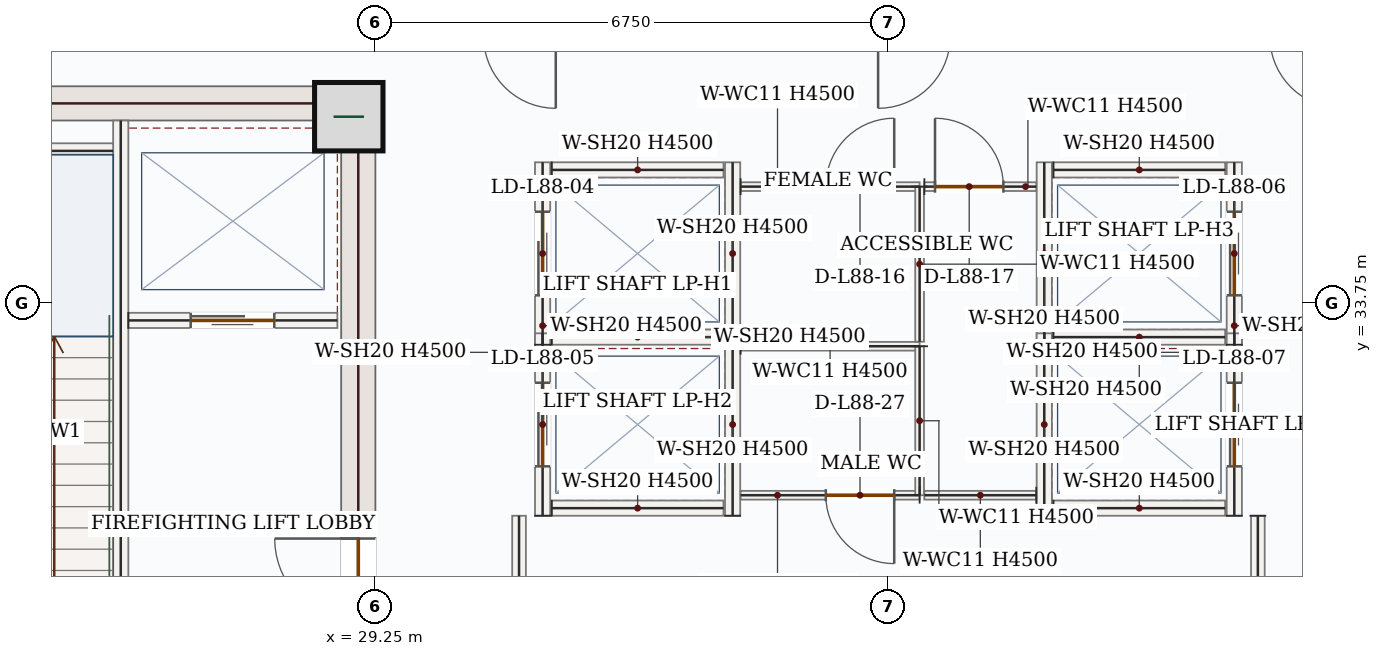
"""IFC4 building model, lengths in metres.
Left out: names, types, materials, properties, quantities, classifications, styles, units other than length and angle.
Written with IfcOpenShell. Run it as: python <this file> out.ifc"""

import sys

from ifc_helpers import new_model, si_unit, direction, frame, frame_2d, origin, origin_2d, place, context, subcontext, project, spatial, rectangle, extrude, source, transform, mapped, element, fill, save


model = new_model("IFC4")
c1 = context("Model", 3, precision=1e-05, world=origin(), true_north=direction((0.0, 1.0)))
c2 = subcontext(c1, "Body", "Model", "MODEL_VIEW")
j1 = project(units=[si_unit("LENGTHUNIT", "METRE"), si_unit("PLANEANGLEUNIT", "RADIAN")], contexts=[c1])
p1 = place(None, origin())
s1 = spatial("IfcSite", under=j1, at=p1, CompositionType="ELEMENT")
p2 = place(p1, origin())
s2 = spatial("IfcBuilding", under=s1, at=p2, CompositionType="ELEMENT")
p3 = place(p2, frame((0.0, 0.0, 361.05)))
s3 = spatial("IfcBuildingStorey", under=s2, at=p3, CompositionType="ELEMENT", Elevation=361.05)
p4 = place(p3, frame((29.025, 28.05, 0.0), z_axis=(0.0, 0.0, 1.0), x_axis=(0.0, 1.0, 0.0)))
e1 = element("IfcWall", 1, at=p4, inside=s3, PredefinedType="SHEAR", context=c2, shape_type="SweptSolid", body=[
    extrude(rectangle(XDim=8.55, YDim=0.45, at=frame_2d((4.275, 0.0))), origin(), (0.0, 0.0, 1.0), 4.5),
])
p5 = place(p4, frame((1.5, 0.0, 0.0)))
e2 = element("IfcOpeningElement", 2, at=p5, cuts=e1, PredefinedType="OPENING", context=c2, shape_type="SweptSolid", body=[
    extrude(rectangle(XDim=1.1, YDim=2.2, at=frame_2d((0.55, 1.1))), frame((0.0, 0.235, 0.0), z_axis=(0.0, -1.0, 0.0), x_axis=(1.0, 0.0, 0.0)), (0.0, 0.0, 1.0), 0.47),
])
m1 = source(origin(), c2, "Body", "SweptSolid", [
    extrude(rectangle(XDim=7.1, YDim=0.45, at=frame_2d((3.55, 0.0))), origin(), (0.0, 0.0, 1.0), 4.5),
])
p6 = place(p3, frame((21.7, 36.375, 0.0), z_axis=(0.0, 0.0, 1.0), x_axis=(1.0, 0.0, 0.0)))
e3 = element("IfcWall", 3, at=p6, inside=s3, PredefinedType="SHEAR", context=c2, shape_type="MappedRepresentation", body=[
    mapped(m1, transform((0.0, 0.0, 0.0), x_axis=(1.0, 0.0, 0.0), y_axis=(0.0, 1.0, 0.0), z_axis=(0.0, 0.0, 1.0), scale=1.0)),
])
m2 = source(origin(), c2, "Body", "SweptSolid", [
    extrude(rectangle(XDim=0.9, YDim=0.9, at=origin_2d()), origin(), (0.0, 0.0, 1.0), 4.8),
])
p7 = place(p3, frame((28.9, 36.2, 0.0), z_axis=(0.0, 0.0, 1.0), x_axis=(1.0, 0.0, 0.0)))
e4 = element("IfcColumn", 4, at=p7, inside=s3, PredefinedType="COLUMN", context=c2, shape_type="MappedRepresentation", body=[
    mapped(m2, transform((0.0, 0.0, 0.0), x_axis=(1.0, 0.0, 0.0), y_axis=(0.0, 1.0, 0.0), z_axis=(0.0, 0.0, 1.0), scale=1.0)),
])
p8 = place(p3, frame((25.9, 28.15, 0.0), z_axis=(0.0, 0.0, 1.0), x_axis=(0.0, 1.0, 0.0)))
e5 = element("IfcWall", 5, at=p8, inside=s3, PredefinedType="SOLIDWALL", context=c2, shape_type="SweptSolid", body=[
    extrude(rectangle(XDim=8.0, YDim=0.2, at=frame_2d((4.0, 0.0))), origin(), (0.0, 0.0, 1.0), 4.5),
])
p9 = place(p8, frame((0.4, 0.0, 0.0)))
e6 = element("IfcOpeningElement", 6, at=p9, cuts=e5, PredefinedType="OPENING", context=c2, shape_type="SweptSolid", body=[
    extrude(rectangle(XDim=1.05, YDim=2.15, at=frame_2d((0.525, 1.075))), frame((0.0, 0.11, 0.0), z_axis=(0.0, -1.0, 0.0), x_axis=(1.0, 0.0, 0.0)), (0.0, 0.0, 1.0), 0.22),
])
m3 = source(origin(), c2, "Body", "SweptSolid", [
    extrude(rectangle(XDim=3.25, YDim=0.2, at=frame_2d((1.625, 0.0))), origin(), (0.0, 0.0, 1.0), 4.5),
])
p10 = place(p3, frame((22.55, 35.75, 0.0), z_axis=(0.0, 0.0, 1.0), x_axis=(1.0, 0.0, 0.0)))
e7 = element("IfcWall", 7, at=p10, inside=s3, PredefinedType="SOLIDWALL", context=c2, shape_type="MappedRepresentation", body=[
    mapped(m3, transform((0.0, 0.0, 0.0), x_axis=(1.0, 0.0, 0.0), y_axis=(0.0, 1.0, 0.0), z_axis=(0.0, 0.0, 1.0), scale=1.0)),
])
p11 = place(p3, frame((26.0, 33.52, 0.0), z_axis=(0.0, 0.0, 1.0), x_axis=(1.0, 0.0, 0.0)))
e8 = element("IfcWall", 8, at=p11, inside=s3, PredefinedType="SOLIDWALL", context=c2, shape_type="SweptSolid", body=[
    extrude(rectangle(XDim=2.75, YDim=0.2, at=frame_2d((1.375, 0.0))), origin(), (0.0, 0.0, 1.0), 4.5),
])
p12 = place(p11, frame((0.82, 0.0, 0.0)))
e9 = element("IfcOpeningElement", 9, at=p12, cuts=e8, PredefinedType="OPENING", context=c2, shape_type="SweptSolid", body=[
    extrude(rectangle(XDim=1.1, YDim=2.15, at=frame_2d((0.55, 1.075))), frame((0.0, 0.11, 0.0), z_axis=(0.0, -1.0, 0.0), x_axis=(1.0, 0.0, 0.0)), (0.0, 0.0, 1.0), 0.22),
])
p13 = place(p3, frame((31.45, 33.2, 0.0), z_axis=(0.0, 0.0, 1.0), x_axis=(0.0, 1.0, 0.0)))
e10 = element("IfcWall", 10, at=p13, inside=s3, PredefinedType="SOLIDWALL", context=c2, shape_type="SweptSolid", body=[
    extrude(rectangle(XDim=2.4, YDim=0.2, at=frame_2d((1.2, 0.0))), origin(), (0.0, 0.0, 1.0), 4.5),
])
p14 = place(p13, frame((0.65, 0.0, 0.0)))
e11 = element("IfcOpeningElement", 11, at=p14, cuts=e10, PredefinedType="OPENING", context=c2, shape_type="SweptSolid", body=[
    extrude(rectangle(XDim=1.1, YDim=2.15, at=frame_2d((0.55, 1.075))), frame((0.0, 0.11, 0.0), z_axis=(0.0, -1.0, 0.0), x_axis=(1.0, 0.0, 0.0)), (0.0, 0.0, 1.0), 0.22),
])
m4 = source(origin(), c2, "Body", "SweptSolid", [
    extrude(rectangle(XDim=2.4, YDim=0.2, at=frame_2d((1.2, 0.0))), origin(), (0.0, 0.0, 1.0), 4.5),
])
p15 = place(p3, frame((33.95, 33.2, 0.0), z_axis=(0.0, 0.0, 1.0), x_axis=(0.0, 1.0, 0.0)))
e12 = element("IfcWall", 12, at=p15, inside=s3, PredefinedType="SOLIDWALL", context=c2, shape_type="MappedRepresentation", body=[
    mapped(m4, transform((0.0, 0.0, 0.0), x_axis=(1.0, 0.0, 0.0), y_axis=(0.0, 1.0, 0.0), z_axis=(0.0, 0.0, 1.0), scale=1.0)),
])
m5 = source(origin(), c2, "Body", "SweptSolid", [
    extrude(rectangle(XDim=2.26, YDim=0.2, at=frame_2d((1.13, 0.0))), origin(), (0.0, 0.0, 1.0), 4.5),
])
for number, where, z_axis, x_axis in (
    (13, (31.57, 33.3, 0.0), (0.0, 0.0, 1.0), (1.0, 0.0, 0.0)),
    (14, (31.57, 35.5, 0.0), (0.0, 0.0, 1.0), (1.0, 0.0, 0.0)),
):
    element("IfcWall", number, at=place(p3, frame(where, z_axis=z_axis, x_axis=x_axis)), inside=s3, PredefinedType="SOLIDWALL", context=c2, shape_type="MappedRepresentation", body=[
        mapped(m5, transform((0.0, 0.0, 0.0), x_axis=(1.0, 0.0, 0.0), y_axis=(0.0, 1.0, 0.0), z_axis=(0.0, 0.0, 1.0), scale=1.0)),
    ])
p16 = place(p3, frame((31.45, 30.95, 0.0), z_axis=(0.0, 0.0, 1.0), x_axis=(0.0, 1.0, 0.0)))
e15 = element("IfcWall", 15, at=p16, inside=s3, PredefinedType="SOLIDWALL", context=c2, shape_type="SweptSolid", body=[
    extrude(rectangle(XDim=2.4, YDim=0.2, at=frame_2d((1.2, 0.0))), origin(), (0.0, 0.0, 1.0), 4.5),
])
p17 = place(p16, frame((0.65, 0.0, 0.0)))
e16 = element("IfcOpeningElement", 16, at=p17, cuts=e15, PredefinedType="OPENING", context=c2, shape_type="SweptSolid", body=[
    extrude(rectangle(XDim=1.1, YDim=2.15, at=frame_2d((0.55, 1.075))), frame((0.0, 0.11, 0.0), z_axis=(0.0, -1.0, 0.0), x_axis=(1.0, 0.0, 0.0)), (0.0, 0.0, 1.0), 0.22),
])
p18 = place(p3, frame((33.95, 30.95, 0.0), z_axis=(0.0, 0.0, 1.0), x_axis=(0.0, 1.0, 0.0)))
e17 = element("IfcWall", 17, at=p18, inside=s3, PredefinedType="SOLIDWALL", context=c2, shape_type="MappedRepresentation", body=[
    mapped(m4, transform((0.0, 0.0, 0.0), x_axis=(1.0, 0.0, 0.0), y_axis=(0.0, 1.0, 0.0), z_axis=(0.0, 0.0, 1.0), scale=1.0)),
])
p19 = place(p3, frame((31.57, 31.05, 0.0), z_axis=(0.0, 0.0, 1.0), x_axis=(1.0, 0.0, 0.0)))
e18 = element("IfcWall", 18, at=p19, inside=s3, PredefinedType="SOLIDWALL", context=c2, shape_type="MappedRepresentation", body=[
    mapped(m5, transform((0.0, 0.0, 0.0), x_axis=(1.0, 0.0, 0.0), y_axis=(0.0, 1.0, 0.0), z_axis=(0.0, 0.0, 1.0), scale=1.0)),
])
p20 = place(p3, frame((38.05, 33.2, 0.0), z_axis=(0.0, 0.0, 1.0), x_axis=(0.0, 1.0, 0.0)))
e19 = element("IfcWall", 19, at=p20, inside=s3, PredefinedType="SOLIDWALL", context=c2, shape_type="MappedRepresentation", body=[
    mapped(m4, transform((0.0, 0.0, 0.0), x_axis=(1.0, 0.0, 0.0), y_axis=(0.0, 1.0, 0.0), z_axis=(0.0, 0.0, 1.0), scale=1.0)),
])
p21 = place(p3, frame((40.55, 33.2, 0.0), z_axis=(0.0, 0.0, 1.0), x_axis=(0.0, 1.0, 0.0)))
e20 = element("IfcWall", 20, at=p21, inside=s3, PredefinedType="SOLIDWALL", context=c2, shape_type="SweptSolid", body=[
    extrude(rectangle(XDim=2.4, YDim=0.2, at=frame_2d((1.2, 0.0))), origin(), (0.0, 0.0, 1.0), 4.5),
])
p22 = place(p21, frame((0.65, 0.0, 0.0)))
e21 = element("IfcOpeningElement", 21, at=p22, cuts=e20, PredefinedType="OPENING", context=c2, shape_type="SweptSolid", body=[
    extrude(rectangle(XDim=1.1, YDim=2.15, at=frame_2d((0.55, 1.075))), frame((0.0, 0.11, 0.0), z_axis=(0.0, -1.0, 0.0), x_axis=(1.0, 0.0, 0.0)), (0.0, 0.0, 1.0), 0.22),
])
for number, where, z_axis, x_axis in (
    (22, (38.17, 33.3, 0.0), (0.0, 0.0, 1.0), (1.0, 0.0, 0.0)),
    (23, (38.17, 35.5, 0.0), (0.0, 0.0, 1.0), (1.0, 0.0, 0.0)),
):
    element("IfcWall", number, at=place(p3, frame(where, z_axis=z_axis, x_axis=x_axis)), inside=s3, PredefinedType="SOLIDWALL", context=c2, shape_type="MappedRepresentation", body=[
        mapped(m5, transform((0.0, 0.0, 0.0), x_axis=(1.0, 0.0, 0.0), y_axis=(0.0, 1.0, 0.0), z_axis=(0.0, 0.0, 1.0), scale=1.0)),
    ])
p23 = place(p3, frame((38.05, 30.95, 0.0), z_axis=(0.0, 0.0, 1.0), x_axis=(0.0, 1.0, 0.0)))
e24 = element("IfcWall", 24, at=p23, inside=s3, PredefinedType="SOLIDWALL", context=c2, shape_type="MappedRepresentation", body=[
    mapped(m4, transform((0.0, 0.0, 0.0), x_axis=(1.0, 0.0, 0.0), y_axis=(0.0, 1.0, 0.0), z_axis=(0.0, 0.0, 1.0), scale=1.0)),
])
p24 = place(p3, frame((40.55, 30.95, 0.0), z_axis=(0.0, 0.0, 1.0), x_axis=(0.0, 1.0, 0.0)))
e25 = element("IfcWall", 25, at=p24, inside=s3, PredefinedType="SOLIDWALL", context=c2, shape_type="SweptSolid", body=[
    extrude(rectangle(XDim=2.4, YDim=0.2, at=frame_2d((1.2, 0.0))), origin(), (0.0, 0.0, 1.0), 4.5),
])
p25 = place(p24, frame((0.65, 0.0, 0.0)))
e26 = element("IfcOpeningElement", 26, at=p25, cuts=e25, PredefinedType="OPENING", context=c2, shape_type="SweptSolid", body=[
    extrude(rectangle(XDim=1.1, YDim=2.15, at=frame_2d((0.55, 1.075))), frame((0.0, 0.11, 0.0), z_axis=(0.0, -1.0, 0.0), x_axis=(1.0, 0.0, 0.0)), (0.0, 0.0, 1.0), 0.22),
])
p26 = place(p3, frame((38.17, 31.05, 0.0), z_axis=(0.0, 0.0, 1.0), x_axis=(1.0, 0.0, 0.0)))
e27 = element("IfcWall", 27, at=p26, inside=s3, PredefinedType="SOLIDWALL", context=c2, shape_type="MappedRepresentation", body=[
    mapped(m5, transform((0.0, 0.0, 0.0), x_axis=(1.0, 0.0, 0.0), y_axis=(0.0, 1.0, 0.0), z_axis=(0.0, 0.0, 1.0), scale=1.0)),
])
p27 = place(p3, frame((36.41, 31.22, 0.0), z_axis=(0.0, 0.0, 1.0), x_axis=(-1.0, 0.0, 0.0)))
e28 = element("IfcWall", 28, at=p27, inside=s3, PredefinedType="PARTITIONING", context=c2, shape_type="SweptSolid", body=[
    extrude(rectangle(XDim=2.355, YDim=0.115, at=frame_2d((1.177, 0.0))), origin(), (0.0, 0.0, 1.0), 4.5),
])
p28 = place(p27, frame((0.334, 0.0, 0.0)))
e29 = element("IfcOpeningElement", 29, at=p28, cuts=e28, PredefinedType="OPENING", context=c2, shape_type="SweptSolid", body=[
    extrude(rectangle(XDim=0.9, YDim=2.1, at=frame_2d((0.45, 1.05))), frame((0.0, 0.067, 0.0), z_axis=(0.0, -1.0, 0.0), x_axis=(1.0, 0.0, 0.0)), (0.0, 0.0, 1.0), 0.135),
])
m6 = source(origin(), c2, "Body", "SweptSolid", [
    extrude(rectangle(XDim=2.355, YDim=0.115, at=frame_2d((1.177, 0.0))), origin(), (0.0, 0.0, 1.0), 4.5),
])
p29 = place(p3, frame((34.055, 33.18, 0.0), z_axis=(0.0, 0.0, 1.0), x_axis=(1.0, 0.0, 0.0)))
e30 = element("IfcWall", 30, at=p29, inside=s3, PredefinedType="PARTITIONING", context=c2, shape_type="MappedRepresentation", body=[
    mapped(m6, transform((0.0, 0.0, 0.0), x_axis=(1.0, 0.0, 0.0), y_axis=(0.0, 1.0, 0.0), z_axis=(0.0, 0.0, 1.0), scale=1.0)),
])
m7 = source(origin(), c2, "Body", "SweptSolid", [
    extrude(rectangle(XDim=1.96, YDim=0.115, at=frame_2d((0.98, 0.0))), origin(), (0.0, 0.0, 1.0), 4.5),
])
p30 = place(p3, frame((36.41, 33.18, 0.0), z_axis=(0.0, 0.0, 1.0), x_axis=(0.0, -1.0, 0.0)))
e31 = element("IfcWall", 31, at=p30, inside=s3, PredefinedType="PARTITIONING", context=c2, shape_type="MappedRepresentation", body=[
    mapped(m7, transform((0.0, 0.0, 0.0), x_axis=(1.0, 0.0, 0.0), y_axis=(0.0, 1.0, 0.0), z_axis=(0.0, 0.0, 1.0), scale=1.0)),
])
p31 = place(p3, frame((34.055, 35.28, 0.0), z_axis=(0.0, 0.0, 1.0), x_axis=(1.0, 0.0, 0.0)))
e32 = element("IfcWall", 32, at=p31, inside=s3, PredefinedType="PARTITIONING", context=c2, shape_type="SweptSolid", body=[
    extrude(rectangle(XDim=2.355, YDim=0.115, at=frame_2d((1.177, 0.0))), origin(), (0.0, 0.0, 1.0), 4.5),
])
p32 = place(p31, frame((1.121, 0.0, 0.0)))
e33 = element("IfcOpeningElement", 33, at=p32, cuts=e32, PredefinedType="OPENING", context=c2, shape_type="SweptSolid", body=[
    extrude(rectangle(XDim=0.9, YDim=2.1, at=frame_2d((0.45, 1.05))), frame((0.0, 0.067, 0.0), z_axis=(0.0, -1.0, 0.0), x_axis=(1.0, 0.0, 0.0)), (0.0, 0.0, 1.0), 0.135),
])
m8 = source(origin(), c2, "Body", "SweptSolid", [
    extrude(rectangle(XDim=2.04, YDim=0.115, at=frame_2d((1.02, 0.0))), origin(), (0.0, 0.0, 1.0), 4.5),
])
p33 = place(p3, frame((36.41, 35.28, 0.0), z_axis=(0.0, 0.0, 1.0), x_axis=(0.0, -1.0, 0.0)))
e34 = element("IfcWall", 34, at=p33, inside=s3, PredefinedType="PARTITIONING", context=c2, shape_type="MappedRepresentation", body=[
    mapped(m8, transform((0.0, 0.0, 0.0), x_axis=(1.0, 0.0, 0.0), y_axis=(0.0, 1.0, 0.0), z_axis=(0.0, 0.0, 1.0), scale=1.0)),
])
m9 = source(origin(), c2, "Body", "SweptSolid", [
    extrude(rectangle(XDim=1.473, YDim=0.115, at=frame_2d((0.736, 0.0))), origin(), (0.0, 0.0, 1.0), 4.5),
])
p34 = place(p3, frame((37.945, 31.22, 0.0), z_axis=(0.0, 0.0, 1.0), x_axis=(-1.0, 0.0, 0.0)))
e35 = element("IfcWall", 35, at=p34, inside=s3, PredefinedType="PARTITIONING", context=c2, shape_type="MappedRepresentation", body=[
    mapped(m9, transform((0.0, 0.0, 0.0), x_axis=(1.0, 0.0, 0.0), y_axis=(0.0, 1.0, 0.0), z_axis=(0.0, 0.0, 1.0), scale=1.0)),
])
p35 = place(p3, frame((36.472, 35.28, 0.0), z_axis=(0.0, 0.0, 1.0), x_axis=(1.0, 0.0, 0.0)))
e36 = element("IfcWall", 36, at=p35, inside=s3, PredefinedType="PARTITIONING", context=c2, shape_type="SweptSolid", body=[
    extrude(rectangle(XDim=1.473, YDim=0.115, at=frame_2d((0.736, 0.0))), origin(), (0.0, 0.0, 1.0), 4.5),
])
p36 = place(p35, frame((0.14, 0.0, 0.0)))
e37 = element("IfcOpeningElement", 37, at=p36, cuts=e36, PredefinedType="OPENING", context=c2, shape_type="SweptSolid", body=[
    extrude(rectangle(XDim=0.9, YDim=2.1, at=frame_2d((0.45, 1.05))), frame((0.0, 0.067, 0.0), z_axis=(0.0, -1.0, 0.0), x_axis=(1.0, 0.0, 0.0)), (0.0, 0.0, 1.0), 0.135),
])
m10 = source(origin(), c2, "Body", "SweptSolid", [
    extrude(rectangle(XDim=5.14, YDim=0.18, at=frame_2d((2.57, 0.0))), origin(), (0.0, 0.0, 1.0), 4.5),
])
p37 = place(p3, frame((31.14, 25.81, 0.0), z_axis=(0.0, 0.0, 1.0), x_axis=(0.0, 1.0, 0.0)))
e38 = element("IfcWall", 38, at=p37, inside=s3, PredefinedType="PARTITIONING", context=c2, shape_type="MappedRepresentation", body=[
    mapped(m10, transform((0.0, 0.0, 0.0), x_axis=(1.0, 0.0, 0.0), y_axis=(0.0, 1.0, 0.0), z_axis=(0.0, 0.0, 1.0), scale=1.0)),
])
p38 = place(p3, frame((40.86, 30.95, 0.0), z_axis=(0.0, 0.0, 1.0), x_axis=(0.0, -1.0, 0.0)))
e39 = element("IfcWall", 39, at=p38, inside=s3, PredefinedType="PARTITIONING", context=c2, shape_type="SweptSolid", body=[
    extrude(rectangle(XDim=5.215, YDim=0.18, at=frame_2d((2.607, 0.0))), origin(), (0.0, 0.0, 1.0), 4.5),
])
p39 = place(p38, frame((3.302, 0.0, 0.0)))
e40 = element("IfcOpeningElement", 40, at=p39, cuts=e39, PredefinedType="OPENING", context=c2, shape_type="SweptSolid", body=[
    extrude(rectangle(XDim=1.0, YDim=2.15, at=frame_2d((0.5, 1.075))), frame((0.0, 0.1, 0.0), z_axis=(0.0, -1.0, 0.0), x_axis=(1.0, 0.0, 0.0)), (0.0, 0.0, 1.0), 0.2),
])
m11 = source(origin(), c2, "Body", "SweptSolid", [
    extrude(rectangle(XDim=1.1, YDim=2.15, at=frame_2d((0.55, 1.075))), frame((0.0, 0.025, 0.0), z_axis=(0.0, -1.0, 0.0), x_axis=(1.0, 0.0, 0.0)), (0.0, 0.0, 1.0), 0.05),
])
p40 = place(p12, origin())
e41 = element("IfcDoor", 41, at=p40, inside=s3, OperationType="DOUBLE_DOOR_SLIDING", PredefinedType="DOOR", context=c2, shape_type="MappedRepresentation", body=[
    mapped(m11, transform((0.0, 0.0, 0.0), x_axis=(1.0, 0.0, 0.0), y_axis=(0.0, 1.0, 0.0), z_axis=(0.0, 0.0, 1.0), scale=1.0)),
])
fill(e9, e41)
m12 = source(origin(), c2, "Body", "SweptSolid", [
    extrude(rectangle(XDim=1.1, YDim=2.2, at=frame_2d((0.55, 1.1))), frame((0.0, 0.025, 0.0), z_axis=(0.0, -1.0, 0.0), x_axis=(1.0, 0.0, 0.0)), (0.0, 0.0, 1.0), 0.05),
])
p41 = place(p5, origin())
e42 = element("IfcDoor", 42, at=p41, inside=s3, OperationType="SINGLE_SWING_RIGHT", PredefinedType="DOOR", context=c2, shape_type="MappedRepresentation", body=[
    mapped(m12, transform((0.0, 0.0, 0.0), x_axis=(1.0, 0.0, 0.0), y_axis=(0.0, 1.0, 0.0), z_axis=(0.0, 0.0, 1.0), scale=1.0)),
])
fill(e2, e42)
p42 = place(p14, origin())
e43 = element("IfcDoor", 43, at=p42, inside=s3, OperationType="DOUBLE_DOOR_SLIDING", PredefinedType="DOOR", context=c2, shape_type="MappedRepresentation", body=[
    mapped(m11, transform((0.0, 0.0, 0.0), x_axis=(1.0, 0.0, 0.0), y_axis=(0.0, 1.0, 0.0), z_axis=(0.0, 0.0, 1.0), scale=1.0)),
])
fill(e11, e43)
p43 = place(p17, origin())
e44 = element("IfcDoor", 44, at=p43, inside=s3, OperationType="DOUBLE_DOOR_SLIDING", PredefinedType="DOOR", context=c2, shape_type="MappedRepresentation", body=[
    mapped(m11, transform((0.0, 0.0, 0.0), x_axis=(1.0, 0.0, 0.0), y_axis=(0.0, 1.0, 0.0), z_axis=(0.0, 0.0, 1.0), scale=1.0)),
])
fill(e16, e44)
p44 = place(p22, origin())
e45 = element("IfcDoor", 45, at=p44, inside=s3, OperationType="DOUBLE_DOOR_SLIDING", PredefinedType="DOOR", context=c2, shape_type="MappedRepresentation", body=[
    mapped(m11, transform((0.0, 0.0, 0.0), x_axis=(1.0, 0.0, 0.0), y_axis=(0.0, 1.0, 0.0), z_axis=(0.0, 0.0, 1.0), scale=1.0)),
])
fill(e21, e45)
p45 = place(p25, origin())
e46 = element("IfcDoor", 46, at=p45, inside=s3, OperationType="DOUBLE_DOOR_SLIDING", PredefinedType="DOOR", context=c2, shape_type="MappedRepresentation", body=[
    mapped(m11, transform((0.0, 0.0, 0.0), x_axis=(1.0, 0.0, 0.0), y_axis=(0.0, 1.0, 0.0), z_axis=(0.0, 0.0, 1.0), scale=1.0)),
])
fill(e26, e46)
m13 = source(origin(), c2, "Body", "SweptSolid", [
    extrude(rectangle(XDim=0.9, YDim=2.1, at=frame_2d((0.45, 1.05))), frame((0.0, 0.025, 0.0), z_axis=(0.0, -1.0, 0.0), x_axis=(1.0, 0.0, 0.0)), (0.0, 0.0, 1.0), 0.05),
])
p46 = place(p32, origin())
e47 = element("IfcDoor", 47, at=p46, inside=s3, OperationType="SINGLE_SWING_RIGHT", PredefinedType="DOOR", context=c2, shape_type="MappedRepresentation", body=[
    mapped(m13, transform((0.0, 0.0, 0.0), x_axis=(1.0, 0.0, 0.0), y_axis=(0.0, 1.0, 0.0), z_axis=(0.0, 0.0, 1.0), scale=1.0)),
])
fill(e33, e47)
p47 = place(p36, origin())
e48 = element("IfcDoor", 48, at=p47, inside=s3, OperationType="SINGLE_SWING_LEFT", PredefinedType="DOOR", context=c2, shape_type="MappedRepresentation", body=[
    mapped(m13, transform((0.0, 0.0, 0.0), x_axis=(1.0, 0.0, 0.0), y_axis=(0.0, 1.0, 0.0), z_axis=(0.0, 0.0, 1.0), scale=1.0)),
])
fill(e37, e48)
p48 = place(p28, origin())
e49 = element("IfcDoor", 49, at=p48, inside=s3, OperationType="SINGLE_SWING_LEFT", PredefinedType="DOOR", context=c2, shape_type="MappedRepresentation", body=[
    mapped(m13, transform((0.0, 0.0, 0.0), x_axis=(1.0, 0.0, 0.0), y_axis=(0.0, 1.0, 0.0), z_axis=(0.0, 0.0, 1.0), scale=1.0)),
])
fill(e29, e49)
save(model, sys.argv[1])
